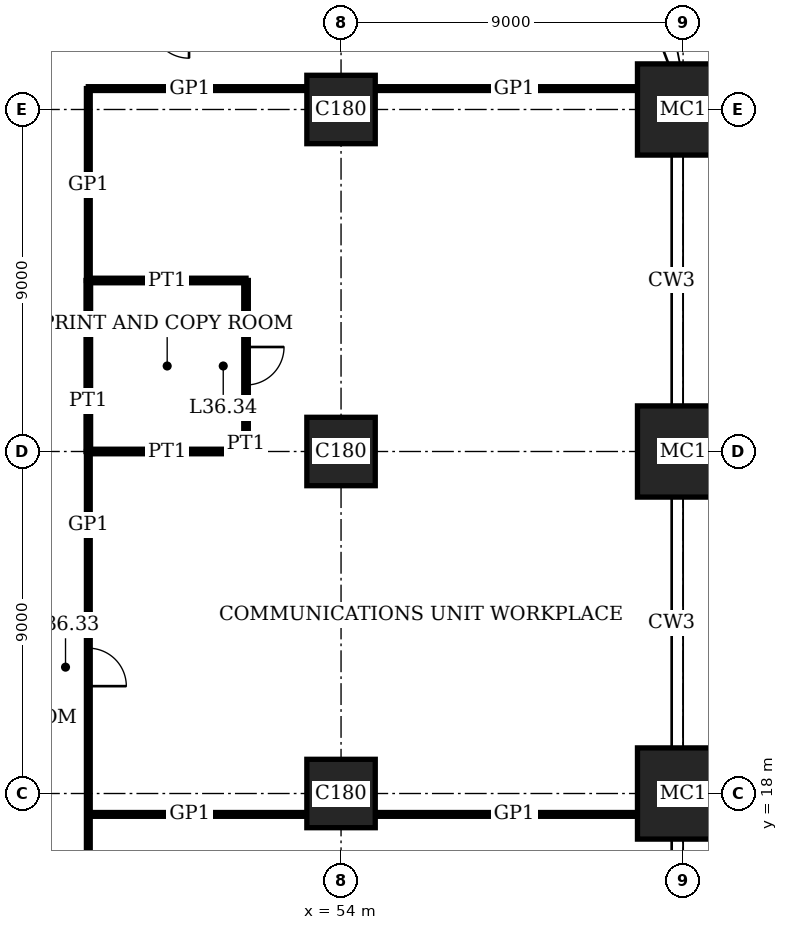
"""IFC4 building model, lengths in metres.
Left out: names, types, materials, properties, quantities, classifications, styles, units other than length and angle.
Written with IfcOpenShell. Run it as: python <this file> out.ifc"""

import sys

from ifc_helpers import new_model, si_unit, direction, frame, frame_2d, origin, origin_2d, place, context, subcontext, project, spatial, rectangle, extrude, element, fill, save


model = new_model("IFC4")
c1 = context("Model", 3, precision=1e-05, world=origin(), true_north=direction((0.0, 1.0)))
c2 = subcontext(c1, "Body", "Model", "MODEL_VIEW")
j1 = project(units=[si_unit("LENGTHUNIT", "METRE"), si_unit("PLANEANGLEUNIT", "RADIAN")], contexts=[c1])
p1 = place(None, origin())
s1 = spatial("IfcSite", under=j1, at=p1, CompositionType="ELEMENT")
p2 = place(p1, origin())
s2 = spatial("IfcBuilding", under=s1, at=p2, CompositionType="ELEMENT")
p3 = place(p2, frame((0.0, 0.0, 149.0)))
s3 = spatial("IfcBuildingStorey", under=s2, at=p3, CompositionType="ELEMENT", Elevation=149.0)
for number, where, z_axis, x_axis in (
    (1, (54.0, 18.0, 0.0), (0.0, 0.0, 1.0), (1.0, 0.0, 0.0)),
    (2, (54.0, 27.0, 0.0), (0.0, 0.0, 1.0), (1.0, 0.0, 0.0)),
    (3, (54.0, 36.0, 0.0), (0.0, 0.0, 1.0), (1.0, 0.0, 0.0)),
):
    element("IfcColumn", number, at=place(p3, frame(where, z_axis=z_axis, x_axis=x_axis)), inside=s3, PredefinedType="COLUMN", context=c2, shape_type="SweptSolid", body=[
        extrude(rectangle(XDim=1.8, YDim=1.8, at=origin_2d()), origin(), (0.0, 0.0, 1.0), 4.0),
    ])
for number, where, z_axis, x_axis in (
    (4, (63.0, 18.0, 0.0), (0.0, 0.0, 1.0), (1.0, 0.0, 0.0)),
    (5, (63.0, 27.0, 0.0), (0.0, 0.0, 1.0), (1.0, 0.0, 0.0)),
    (6, (63.0, 36.0, 0.0), (0.0, 0.0, 1.0), (1.0, 0.0, 0.0)),
):
    element("IfcColumn", number, at=place(p3, frame(where, z_axis=z_axis, x_axis=x_axis)), inside=s3, PredefinedType="COLUMN", context=c2, shape_type="SweptSolid", body=[
        extrude(rectangle(XDim=2.4, YDim=2.4, at=origin_2d()), origin(), (0.0, 0.0, 1.0), 4.0),
    ])
p4 = place(p3, frame((47.35, 17.45, 0.0), z_axis=(0.0, 0.0, 1.0), x_axis=(1.0, 0.0, 0.0)))
e7 = element("IfcWall", 7, at=p4, inside=s3, PredefinedType="PARTITIONING", context=c2, shape_type="SweptSolid", body=[
    extrude(rectangle(XDim=5.75, YDim=0.1, at=frame_2d((2.875, 0.0))), origin(), (0.0, 0.0, 1.0), 3.05),
])
p5 = place(p3, frame((54.9, 17.45, 0.0), z_axis=(0.0, 0.0, 1.0), x_axis=(1.0, 0.0, 0.0)))
e8 = element("IfcWall", 8, at=p5, inside=s3, PredefinedType="PARTITIONING", context=c2, shape_type="SweptSolid", body=[
    extrude(rectangle(XDim=6.9, YDim=0.1, at=frame_2d((3.45, 0.0))), origin(), (0.0, 0.0, 1.0), 3.05),
])
p6 = place(p3, frame((47.35, 27.0, 0.0), z_axis=(0.0, 0.0, 1.0), x_axis=(1.0, 0.0, 0.0)))
e9 = element("IfcWall", 9, at=p6, inside=s3, PredefinedType="PARTITIONING", context=c2, shape_type="SweptSolid", body=[
    extrude(rectangle(XDim=4.15, YDim=0.12, at=frame_2d((2.075, 0.0))), origin(), (0.0, 0.0, 1.0), 3.05),
])
p7 = place(p3, frame((47.35, 31.5, 0.0), z_axis=(0.0, 0.0, 1.0), x_axis=(1.0, 0.0, 0.0)))
e10 = element("IfcWall", 10, at=p7, inside=s3, PredefinedType="PARTITIONING", context=c2, shape_type="SweptSolid", body=[
    extrude(rectangle(XDim=4.15, YDim=0.12, at=frame_2d((2.075, 0.0))), origin(), (0.0, 0.0, 1.0), 3.1),
])
p8 = place(p3, frame((47.35, 36.55, 0.0), z_axis=(0.0, 0.0, 1.0), x_axis=(1.0, 0.0, 0.0)))
e11 = element("IfcWall", 11, at=p8, inside=s3, PredefinedType="PARTITIONING", context=c2, shape_type="SweptSolid", body=[
    extrude(rectangle(XDim=5.75, YDim=0.1, at=frame_2d((2.875, 0.0))), origin(), (0.0, 0.0, 1.0), 3.05),
])
p9 = place(p3, frame((54.9, 36.55, 0.0), z_axis=(0.0, 0.0, 1.0), x_axis=(1.0, 0.0, 0.0)))
e12 = element("IfcWall", 12, at=p9, inside=s3, PredefinedType="PARTITIONING", context=c2, shape_type="SweptSolid", body=[
    extrude(rectangle(XDim=6.9, YDim=0.1, at=frame_2d((3.45, 0.0))), origin(), (0.0, 0.0, 1.0), 3.05),
])
p10 = place(p3, frame((47.35, 27.0, 0.0), z_axis=(0.0, 0.0, 1.0), x_axis=(0.0, 1.0, 0.0)))
e13 = element("IfcWall", 13, at=p10, inside=s3, PredefinedType="PARTITIONING", context=c2, shape_type="SweptSolid", body=[
    extrude(rectangle(XDim=4.5, YDim=0.12, at=frame_2d((2.25, 0.0))), origin(), (0.0, 0.0, 1.0), 3.75),
])
p11 = place(p3, frame((47.35, 15.65, 0.0), z_axis=(0.0, 0.0, 1.0), x_axis=(0.0, 1.0, 0.0)))
e14 = element("IfcWall", 14, at=p11, inside=s3, PredefinedType="PARTITIONING", context=c2, shape_type="SweptSolid", body=[
    extrude(rectangle(XDim=11.35, YDim=0.1, at=frame_2d((5.675, 0.0))), origin(), (0.0, 0.0, 1.0), 3.75),
])
p12 = place(p11, frame((5.175, 0.0, 0.0)))
e15 = element("IfcOpeningElement", 15, at=p12, cuts=e14, PredefinedType="OPENING", context=c2, shape_type="SweptSolid", body=[
    extrude(rectangle(XDim=1.0, YDim=2.4, at=frame_2d((0.5, 1.2))), frame((0.0, 0.06, 0.0), z_axis=(0.0, -1.0, 0.0), x_axis=(1.0, 0.0, 0.0)), (0.0, 0.0, 1.0), 0.12),
])
p13 = place(p3, frame((47.35, 31.5, 0.0), z_axis=(0.0, 0.0, 1.0), x_axis=(0.0, 1.0, 0.0)))
e16 = element("IfcWall", 16, at=p13, inside=s3, PredefinedType="PARTITIONING", context=c2, shape_type="SweptSolid", body=[
    extrude(rectangle(XDim=5.05, YDim=0.1, at=frame_2d((2.525, 0.0))), origin(), (0.0, 0.0, 1.0), 3.75),
])
p14 = place(p3, frame((51.5, 27.0, 0.0), z_axis=(0.0, 0.0, 1.0), x_axis=(0.0, 1.0, 0.0)))
e17 = element("IfcWall", 17, at=p14, inside=s3, PredefinedType="PARTITIONING", context=c2, shape_type="SweptSolid", body=[
    extrude(rectangle(XDim=4.5, YDim=0.12, at=frame_2d((2.25, 0.0))), origin(), (0.0, 0.0, 1.0), 3.75),
])
p15 = place(p14, frame((1.75, 0.0, 0.0)))
e18 = element("IfcOpeningElement", 18, at=p15, cuts=e17, PredefinedType="OPENING", context=c2, shape_type="SweptSolid", body=[
    extrude(rectangle(XDim=1.0, YDim=2.4, at=frame_2d((0.5, 1.2))), frame((0.0, 0.07, 0.0), z_axis=(0.0, -1.0, 0.0), x_axis=(1.0, 0.0, 0.0)), (0.0, 0.0, 1.0), 0.14),
])
p16 = place(p12, origin())
e19 = element("IfcDoor", 19, at=p16, inside=s3, OperationType="SINGLE_SWING_LEFT", PredefinedType="DOOR", context=c2, shape_type="SweptSolid", body=[
    extrude(rectangle(XDim=1.0, YDim=2.4, at=frame_2d((0.5, 1.2))), frame((0.0, 0.02, 0.0), z_axis=(0.0, -1.0, 0.0), x_axis=(1.0, 0.0, 0.0)), (0.0, 0.0, 1.0), 0.04),
])
fill(e15, e19)
p17 = place(p15, origin())
e20 = element("IfcDoor", 20, at=p17, inside=s3, OperationType="SINGLE_SWING_RIGHT", PredefinedType="DOOR", context=c2, shape_type="SweptSolid", body=[
    extrude(rectangle(XDim=1.0, YDim=2.4, at=frame_2d((0.5, 1.2))), frame((0.0, 0.025, 0.0), z_axis=(0.0, -1.0, 0.0), x_axis=(1.0, 0.0, 0.0)), (0.0, 0.0, 1.0), 0.05),
])
fill(e18, e20)
save(model, sys.argv[1])
